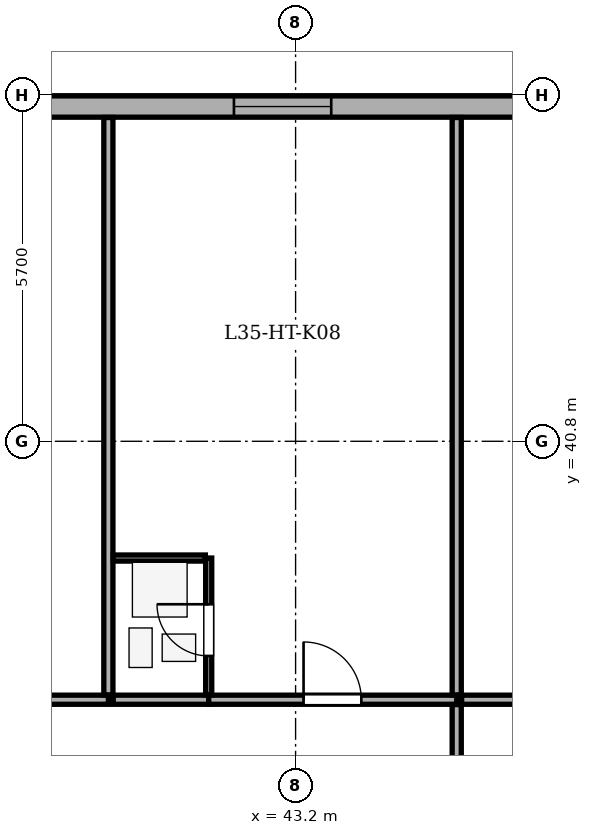
"""IFC4 building model, lengths in metres.
Left out: names, types, materials, properties, quantities, classifications, styles, units other than length and angle.
Written with IfcOpenShell. Run it as: python <this file> out.ifc"""

import sys

from ifc_helpers import new_model, si_unit, direction, frame, frame_2d, origin, place, context, subcontext, project, spatial, rectangle, extrude, element, fill, save


model = new_model("IFC4")
c1 = context("Model", 3, precision=1e-05, world=origin(), true_north=direction((0.0, 1.0)))
c2 = subcontext(c1, "Body", "Model", "MODEL_VIEW")
j1 = project(units=[si_unit("LENGTHUNIT", "METRE"), si_unit("PLANEANGLEUNIT", "RADIAN")], contexts=[c1])
p1 = place(None, origin())
s1 = spatial("IfcSite", under=j1, at=p1, CompositionType="ELEMENT")
p2 = place(p1, origin())
s2 = spatial("IfcBuilding", under=s1, at=p2, CompositionType="ELEMENT")
p3 = place(p2, frame((0.0, 0.0, 141.3)))
s3 = spatial("IfcBuildingStorey", under=s2, at=p3, CompositionType="ELEMENT", Elevation=141.3)
p4 = place(p3, frame((15.7, 46.305, 0.0), z_axis=(0.0, 0.0, 1.0), x_axis=(1.0, 0.0, 0.0)))
e1 = element("IfcWall", 1, at=p4, inside=s3, PredefinedType="STANDARD", context=c2, shape_type="SweptSolid", body=[
    extrude(rectangle(XDim=35.0, YDim=0.35, at=frame_2d((17.5, 0.0))), origin(), (0.0, 0.0, 1.0), 2.785),
])
p5 = place(p4, frame((8.0, 0.0, 0.0)))
e2 = element("IfcOpeningElement", 2, at=p5, cuts=e1, PredefinedType="OPENING", context=c2, shape_type="SweptSolid", body=[
    extrude(rectangle(XDim=1.0, YDim=2.02, at=frame_2d((0.5, 1.01))), frame((0.0, 0.185, 0.0), z_axis=(0.0, -1.0, 0.0), x_axis=(1.0, 0.0, 0.0)), (0.0, 0.0, 1.0), 0.37),
])
p6 = place(p4, frame((1.788, 0.0, 0.75)))
e3 = element("IfcOpeningElement", 3, at=p6, cuts=e1, PredefinedType="OPENING", context=c2, shape_type="SweptSolid", body=[
    extrude(rectangle(XDim=1.6, YDim=1.75, at=frame_2d((0.8, 0.875))), frame((0.0, 0.185, 0.0), z_axis=(0.0, -1.0, 0.0), x_axis=(1.0, 0.0, 0.0)), (0.0, 0.0, 1.0), 0.37),
])
p7 = place(p4, frame((14.495, 0.0, 0.75)))
e4 = element("IfcOpeningElement", 4, at=p7, cuts=e1, PredefinedType="OPENING", context=c2, shape_type="SweptSolid", body=[
    extrude(rectangle(XDim=1.6, YDim=1.75, at=frame_2d((0.8, 0.875))), frame((0.0, 0.185, 0.0), z_axis=(0.0, -1.0, 0.0), x_axis=(1.0, 0.0, 0.0)), (0.0, 0.0, 1.0), 0.37),
])
p8 = place(p4, frame((21.261, 0.0, 0.75)))
e5 = element("IfcOpeningElement", 5, at=p8, cuts=e1, PredefinedType="OPENING", context=c2, shape_type="SweptSolid", body=[
    extrude(rectangle(XDim=1.6, YDim=1.75, at=frame_2d((0.8, 0.875))), frame((0.0, 0.185, 0.0), z_axis=(0.0, -1.0, 0.0), x_axis=(1.0, 0.0, 0.0)), (0.0, 0.0, 1.0), 0.37),
])
p9 = place(p4, frame((26.486, 0.0, 0.75)))
e6 = element("IfcOpeningElement", 6, at=p9, cuts=e1, PredefinedType="OPENING", context=c2, shape_type="SweptSolid", body=[
    extrude(rectangle(XDim=1.6, YDim=1.75, at=frame_2d((0.8, 0.875))), frame((0.0, 0.185, 0.0), z_axis=(0.0, -1.0, 0.0), x_axis=(1.0, 0.0, 0.0)), (0.0, 0.0, 1.0), 0.37),
])
p10 = place(p4, frame((31.637, 0.0, 0.75)))
e7 = element("IfcOpeningElement", 7, at=p10, cuts=e1, PredefinedType="OPENING", context=c2, shape_type="SweptSolid", body=[
    extrude(rectangle(XDim=1.6, YDim=1.75, at=frame_2d((0.8, 0.875))), frame((0.0, 0.185, 0.0), z_axis=(0.0, -1.0, 0.0), x_axis=(1.0, 0.0, 0.0)), (0.0, 0.0, 1.0), 0.37),
])
p11 = place(p3, frame((35.44, 36.55, 0.0), z_axis=(0.0, 0.0, 1.0), x_axis=(1.0, 0.0, 0.0)))
e8 = element("IfcWall", 8, at=p11, inside=s3, PredefinedType="PARTITIONING", context=c2, shape_type="SweptSolid", body=[
    extrude(rectangle(XDim=4.681, YDim=0.15, at=frame_2d((2.341, 0.0))), origin(), (0.0, 0.0, 1.0), 3.2),
])
p12 = place(p11, frame((1.861, 0.0, 0.0)))
e9 = element("IfcOpeningElement", 9, at=p12, cuts=e8, PredefinedType="OPENING", context=c2, shape_type="SweptSolid", body=[
    extrude(rectangle(XDim=0.95, YDim=2.1, at=frame_2d((0.475, 1.05))), frame((0.0, 0.085, 0.0), z_axis=(0.0, -1.0, 0.0), x_axis=(1.0, 0.0, 0.0)), (0.0, 0.0, 1.0), 0.17),
])
p13 = place(p3, frame((40.121, 36.63, 0.0), z_axis=(0.0, 0.0, 1.0), x_axis=(0.0, 1.0, 0.0)))
e10 = element("IfcWall", 10, at=p13, inside=s3, PredefinedType="PARTITIONING", context=c2, shape_type="SweptSolid", body=[
    extrude(rectangle(XDim=9.495, YDim=0.15, at=frame_2d((4.748, 0.0))), origin(), (0.0, 0.0, 1.0), 3.2),
])
p14 = place(p3, frame((40.201, 36.55, 0.0), z_axis=(0.0, 0.0, 1.0), x_axis=(1.0, 0.0, 0.0)))
e11 = element("IfcWall", 11, at=p14, inside=s3, PredefinedType="PARTITIONING", context=c2, shape_type="SweptSolid", body=[
    extrude(rectangle(XDim=1.57, YDim=0.15, at=frame_2d((0.785, 0.0))), origin(), (0.0, 0.0, 1.0), 3.2),
])
p15 = place(p3, frame((41.771, 36.55, 0.0), z_axis=(0.0, 0.0, 1.0), x_axis=(1.0, 0.0, 0.0)))
e12 = element("IfcWall", 12, at=p15, inside=s3, PredefinedType="PARTITIONING", context=c2, shape_type="SweptSolid", body=[
    extrude(rectangle(XDim=4.079, YDim=0.15, at=frame_2d((2.04, 0.0))), origin(), (0.0, 0.0, 1.0), 3.2),
])
p16 = place(p15, frame((1.56, 0.0, 0.0)))
e13 = element("IfcOpeningElement", 13, at=p16, cuts=e12, PredefinedType="OPENING", context=c2, shape_type="SweptSolid", body=[
    extrude(rectangle(XDim=0.95, YDim=2.1, at=frame_2d((0.475, 1.05))), frame((0.0, 0.085, 0.0), z_axis=(0.0, -1.0, 0.0), x_axis=(1.0, 0.0, 0.0)), (0.0, 0.0, 1.0), 0.17),
])
p17 = place(p3, frame((41.771, 36.63, 0.0), z_axis=(0.0, 0.0, 1.0), x_axis=(0.0, 1.0, 0.0)))
e14 = element("IfcWall", 14, at=p17, inside=s3, PredefinedType="PARTITIONING", context=c2, shape_type="SweptSolid", body=[
    extrude(rectangle(XDim=2.25, YDim=0.1, at=frame_2d((1.125, 0.0))), origin(), (0.0, 0.0, 1.0), 3.2),
])
p18 = place(p17, frame((0.64, 0.0, 0.0)))
e15 = element("IfcOpeningElement", 15, at=p18, cuts=e14, PredefinedType="OPENING", context=c2, shape_type="SweptSolid", body=[
    extrude(rectangle(XDim=0.85, YDim=2.05, at=frame_2d((0.425, 1.025))), frame((0.0, 0.06, 0.0), z_axis=(0.0, -1.0, 0.0), x_axis=(1.0, 0.0, 0.0)), (0.0, 0.0, 1.0), 0.12),
])
p19 = place(p3, frame((40.201, 38.88, 0.0), z_axis=(0.0, 0.0, 1.0), x_axis=(1.0, 0.0, 0.0)))
e16 = element("IfcWall", 16, at=p19, inside=s3, PredefinedType="PARTITIONING", context=c2, shape_type="SweptSolid", body=[
    extrude(rectangle(XDim=1.515, YDim=0.1, at=frame_2d((0.758, 0.0))), origin(), (0.0, 0.0, 1.0), 3.2),
])
p20 = place(p3, frame((45.85, 36.63, 0.0), z_axis=(0.0, 0.0, 1.0), x_axis=(0.0, 1.0, 0.0)))
e17 = element("IfcWall", 17, at=p20, inside=s3, PredefinedType="PARTITIONING", context=c2, shape_type="SweptSolid", body=[
    extrude(rectangle(XDim=9.495, YDim=0.15, at=frame_2d((4.748, 0.0))), origin(), (0.0, 0.0, 1.0), 3.2),
])
p21 = place(p3, frame((45.93, 36.55, 0.0), z_axis=(0.0, 0.0, 1.0), x_axis=(1.0, 0.0, 0.0)))
e18 = element("IfcWall", 18, at=p21, inside=s3, PredefinedType="PARTITIONING", context=c2, shape_type="SweptSolid", body=[
    extrude(rectangle(XDim=9.395, YDim=0.15, at=frame_2d((4.698, 0.0))), origin(), (0.0, 0.0, 1.0), 3.2),
])
p22 = place(p3, frame((45.85, 17.93, 0.0), z_axis=(0.0, 0.0, 1.0), x_axis=(0.0, 1.0, 0.0)))
e19 = element("IfcWall", 19, at=p22, inside=s3, PredefinedType="PARTITIONING", context=c2, shape_type="SweptSolid", body=[
    extrude(rectangle(XDim=18.54, YDim=0.15, at=frame_2d((9.27, 0.0))), origin(), (0.0, 0.0, 1.0), 3.2),
])
p23 = place(p22, frame((8.79, 0.0, 0.0)))
e20 = element("IfcOpeningElement", 20, at=p23, cuts=e19, PredefinedType="OPENING", context=c2, shape_type="SweptSolid", body=[
    extrude(rectangle(XDim=0.95, YDim=2.1, at=frame_2d((0.475, 1.05))), frame((0.0, 0.085, 0.0), z_axis=(0.0, -1.0, 0.0), x_axis=(1.0, 0.0, 0.0)), (0.0, 0.0, 1.0), 0.17),
])
p24 = place(p9, origin())
e21 = element("IfcWindow", 21, at=p24, inside=s3, PartitioningType="SINGLE_PANEL", PredefinedType="WINDOW", context=c2, shape_type="SweptSolid", body=[
    extrude(rectangle(XDim=1.6, YDim=1.75, at=frame_2d((0.8, 0.875))), frame((0.0, -0.01, 0.0), z_axis=(0.0, -1.0, 0.0), x_axis=(1.0, 0.0, 0.0)), (0.0, 0.0, 1.0), 0.06),
])
fill(e6, e21)
p25 = place(p18, origin())
e22 = element("IfcDoor", 22, at=p25, inside=s3, OperationType="SINGLE_SWING_RIGHT", PredefinedType="DOOR", context=c2, shape_type="SweptSolid", body=[
    extrude(rectangle(XDim=0.85, YDim=2.05, at=frame_2d((0.425, 1.025))), frame((0.0, 0.025, 0.0), z_axis=(0.0, -1.0, 0.0), x_axis=(1.0, 0.0, 0.0)), (0.0, 0.0, 1.0), 0.05),
])
fill(e15, e22)
p26 = place(p16, origin())
e23 = element("IfcDoor", 23, at=p26, inside=s3, OperationType="SINGLE_SWING_LEFT", PredefinedType="DOOR", context=c2, shape_type="SweptSolid", body=[
    extrude(rectangle(XDim=0.95, YDim=2.1, at=frame_2d((0.475, 1.05))), frame((0.0, 0.025, 0.0), z_axis=(0.0, -1.0, 0.0), x_axis=(1.0, 0.0, 0.0)), (0.0, 0.0, 1.0), 0.05),
])
fill(e13, e23)
save(model, sys.argv[1])
